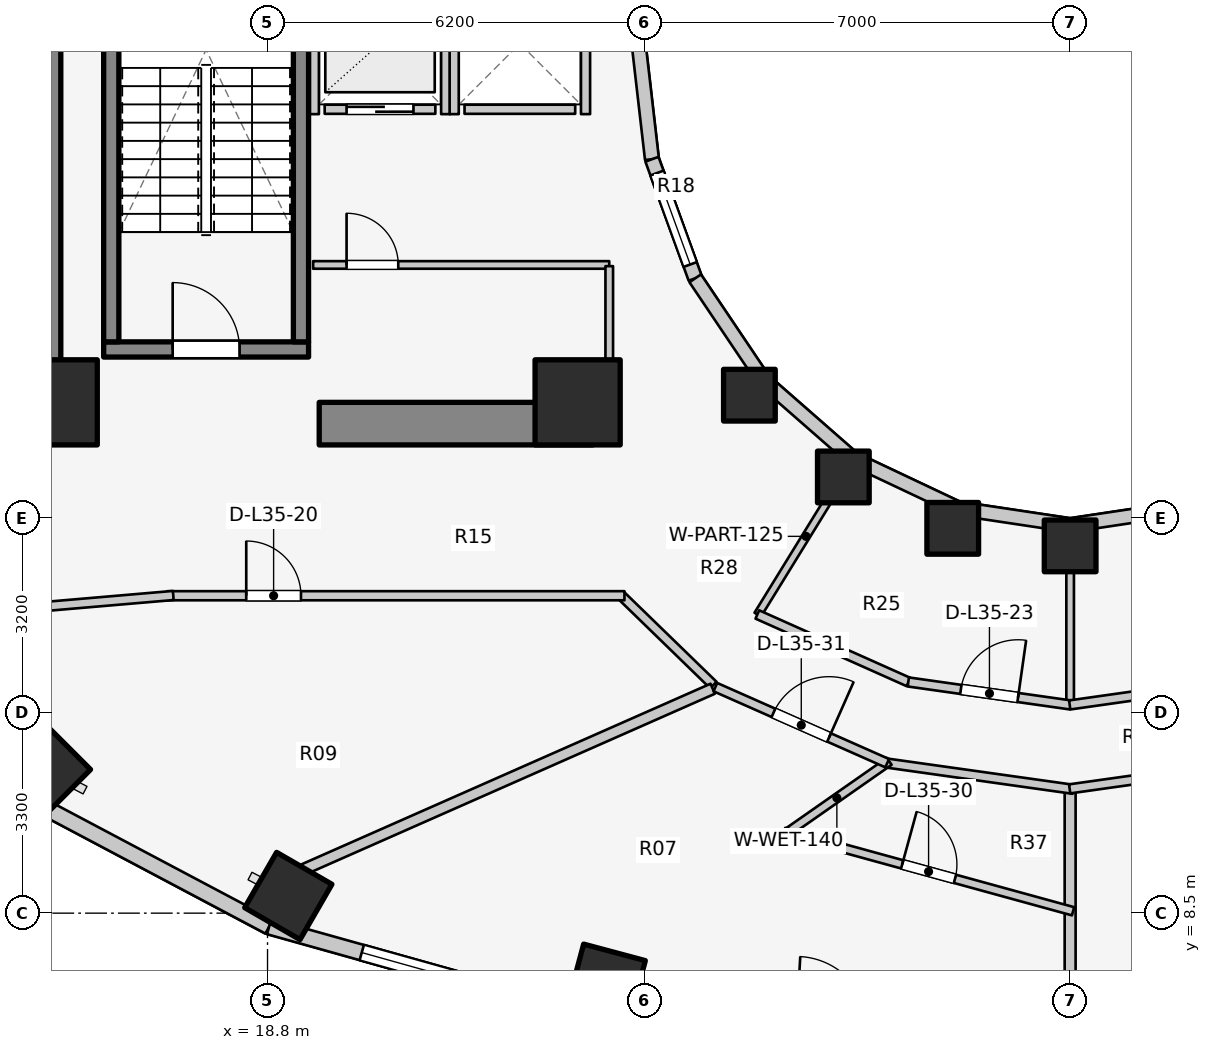
"""IFC4 building model, lengths in metres.
Left out: names, types, materials, properties, quantities, classifications, styles, units other than length and angle.
Written with IfcOpenShell. Run it as: python <this file> out.ifc"""

import sys

from ifc_helpers import new_model, si_unit, direction, frame, frame_2d, origin, origin_2d, place, context, subcontext, project, spatial, rectangle, extrude, element, fill, save


model = new_model("IFC4")
c1 = context("Model", 3, precision=1e-05, world=origin(), true_north=direction((0.0, 1.0)))
c2 = subcontext(c1, "Body", "Model", "MODEL_VIEW")
j1 = project(units=[si_unit("LENGTHUNIT", "METRE"), si_unit("PLANEANGLEUNIT", "RADIAN")], contexts=[c1])
p1 = place(None, origin())
s1 = spatial("IfcSite", under=j1, at=p1, CompositionType="ELEMENT")
p2 = place(p1, origin())
s2 = spatial("IfcBuilding", under=s1, at=p2, CompositionType="ELEMENT")
p3 = place(p2, frame((0.0, 0.0, 116.6)))
s3 = spatial("IfcBuildingStorey", under=s2, at=p3, CompositionType="ELEMENT", Elevation=116.6)
p4 = place(p3, frame((15.05, 17.05, 0.0), z_axis=(0.0, 0.0, 1.0), x_axis=(0.0, 1.0, 0.0)))
e1 = element("IfcWall", 1, at=p4, inside=s3, PredefinedType="SHEAR", context=c2, shape_type="SweptSolid", body=[
    extrude(rectangle(XDim=12.8, YDim=0.7, at=frame_2d((6.4, 0.0))), origin(), (0.0, 0.0, 1.0), 3.1),
])
p5 = place(p3, frame((19.65, 16.55, 0.0), z_axis=(0.0, 0.0, 1.0), x_axis=(1.0, 0.0, 0.0)))
e2 = element("IfcWall", 2, at=p5, inside=s3, PredefinedType="SHEAR", context=c2, shape_type="SweptSolid", body=[
    extrude(rectangle(XDim=4.5, YDim=0.7, at=frame_2d((2.25, 0.0))), origin(), (0.0, 0.0, 1.0), 3.1),
])
p6 = place(p3, frame((16.105, 17.77, 0.0), z_axis=(0.0, 0.0, 1.0), x_axis=(1.0, 0.0, 0.0)))
e3 = element("IfcWall", 3, at=p6, inside=s3, PredefinedType="SOLIDWALL", context=c2, shape_type="SweptSolid", body=[
    extrude(rectangle(XDim=3.37, YDim=0.25, at=frame_2d((1.685, 0.0))), origin(), (0.0, 0.0, 1.0), 3.1),
])
p7 = place(p6, frame((1.135, 0.0, 0.0)))
e4 = element("IfcOpeningElement", 4, at=p7, cuts=e3, PredefinedType="OPENING", context=c2, shape_type="SweptSolid", body=[
    extrude(rectangle(XDim=1.1, YDim=2.1, at=frame_2d((0.55, 1.05))), frame((0.0, 0.135, 0.0), z_axis=(0.0, -1.0, 0.0), x_axis=(1.0, 0.0, 0.0)), (0.0, 0.0, 1.0), 0.27),
])
for number, where, z_axis, x_axis in (
    (5, (16.23, 17.895, 0.0), (0.0, 0.0, 1.0), (0.0, 1.0, 0.0)),
    (6, (19.35, 17.895, 0.0), (0.0, 0.0, 1.0), (0.0, 1.0, 0.0)),
):
    element("IfcWall", number, at=place(p3, frame(where, z_axis=z_axis, x_axis=x_axis)), inside=s3, PredefinedType="SOLIDWALL", context=c2, shape_type="SweptSolid", body=[
        extrude(rectangle(XDim=7.81, YDim=0.25, at=frame_2d((3.905, 0.0))), origin(), (0.0, 0.0, 1.0), 3.1),
    ])
for number, where, z_axis, x_axis in (
    (7, (15.3, 16.9, 0.0), (0.0, 0.0, 1.0), (1.0, 0.0, 0.0)),
    (8, (23.9, 16.9, 0.0), (0.0, 0.0, 1.0), (1.0, 0.0, 0.0)),
):
    element("IfcColumn", number, at=place(p3, frame(where, z_axis=z_axis, x_axis=x_axis)), inside=s3, PredefinedType="COLUMN", context=c2, shape_type="SweptSolid", body=[
        extrude(rectangle(XDim=1.4, YDim=1.4, at=origin_2d()), origin(), (0.0, 0.0, 1.0), 3.1),
    ])
p8 = place(p3, frame((26.725, 17.018, 0.0), z_axis=(0.0, 0.0, 1.0), x_axis=(1.0, 0.0, 0.0)))
e9 = element("IfcColumn", 9, at=p8, inside=s3, PredefinedType="COLUMN", context=c2, shape_type="SweptSolid", body=[
    extrude(rectangle(XDim=0.85, YDim=0.85, at=origin_2d()), origin(), (0.0, 0.0, 1.0), 3.1),
])
p9 = place(p3, frame((15.147, 10.862, 0.0), z_axis=(0.0, 0.0, 1.0), x_axis=(-0.707106781187, -0.707106781187, 0.0)))
e10 = element("IfcColumn", 10, at=p9, inside=s3, PredefinedType="COLUMN", context=c2, shape_type="SweptSolid", body=[
    extrude(rectangle(XDim=1.05, YDim=1.05, at=origin_2d()), origin(), (0.0, 0.0, 1.0), 3.1),
])
p10 = place(p3, frame((28.27, 15.673, 0.0), z_axis=(0.0, 0.0, 1.0), x_axis=(1.0, 0.0, 0.0)))
e11 = element("IfcColumn", 11, at=p10, inside=s3, PredefinedType="COLUMN", context=c2, shape_type="SweptSolid", body=[
    extrude(rectangle(XDim=0.85, YDim=0.85, at=origin_2d()), origin(), (0.0, 0.0, 1.0), 3.1),
])
p11 = place(p3, frame((19.142, 8.782, 0.0), z_axis=(0.0, 0.0, 1.0), x_axis=(-0.5, -0.866025403784, 0.0)))
e12 = element("IfcColumn", 12, at=p11, inside=s3, PredefinedType="COLUMN", context=c2, shape_type="SweptSolid", body=[
    extrude(rectangle(XDim=1.05, YDim=1.05, at=origin_2d()), origin(), (0.0, 0.0, 1.0), 3.1),
])
p12 = place(p3, frame((30.069, 14.828, 0.0), z_axis=(0.0, 0.0, 1.0), x_axis=(1.0, 0.0, 0.0)))
e13 = element("IfcColumn", 13, at=p12, inside=s3, PredefinedType="COLUMN", context=c2, shape_type="SweptSolid", body=[
    extrude(rectangle(XDim=0.85, YDim=0.85, at=origin_2d()), origin(), (0.0, 0.0, 1.0), 3.1),
])
p13 = place(p3, frame((24.371, 7.348, 0.0), z_axis=(0.0, 0.0, 1.0), x_axis=(-0.258819045103, -0.965925826289, 0.0)))
e14 = element("IfcColumn", 14, at=p13, inside=s3, PredefinedType="COLUMN", context=c2, shape_type="SweptSolid", body=[
    extrude(rectangle(XDim=1.05, YDim=1.05, at=origin_2d()), origin(), (0.0, 0.0, 1.0), 3.1),
])
p14 = place(p3, frame((32.0, 14.54, 0.0), z_axis=(0.0, 0.0, 1.0), x_axis=(1.0, 0.0, 0.0)))
e15 = element("IfcColumn", 15, at=p14, inside=s3, PredefinedType="COLUMN", context=c2, shape_type="SweptSolid", body=[
    extrude(rectangle(XDim=0.85, YDim=0.85, at=origin_2d()), origin(), (0.0, 0.0, 1.0), 3.1),
])
p15 = place(p3, frame((24.88, 23.0, 0.0), z_axis=(0.0, 0.0, 1.0), x_axis=(0.114711713601, -0.993398823617, 0.0)))
e16 = element("IfcWall", 16, at=p15, inside=s3, PredefinedType="STANDARD", context=c2, shape_type="SweptSolid", body=[
    extrude(rectangle(XDim=2.115, YDim=0.23, at=frame_2d((1.058, 0.0))), origin(), (0.0, 0.0, 1.0), 2.84),
])
p16 = place(p3, frame((25.123, 20.898, 0.0), z_axis=(0.0, 0.0, 1.0), x_axis=(0.341423187295, -0.93990968033, 0.0)))
e17 = element("IfcWall", 17, at=p16, inside=s3, PredefinedType="STANDARD", context=c2, shape_type="SweptSolid", body=[
    extrude(rectangle(XDim=2.084, YDim=0.23, at=frame_2d((1.042, 0.0))), origin(), (0.0, 0.0, 1.0), 2.84),
])
p17 = place(p16, frame((0.242, 0.0, 0.85)))
e18 = element("IfcOpeningElement", 18, at=p17, cuts=e17, PredefinedType="OPENING", context=c2, shape_type="SweptSolid", body=[
    extrude(rectangle(XDim=1.6, YDim=1.65, at=frame_2d((0.8, 0.825))), frame((0.0, 0.125, 0.0), z_axis=(0.0, -1.0, 0.0), x_axis=(1.0, 0.0, 0.0)), (0.0, 0.0, 1.0), 0.25),
])
p18 = place(p3, frame((25.834, 18.94, 0.0), z_axis=(0.0, 0.0, 1.0), x_axis=(0.558197800898, -0.829707909492, 0.0)))
e19 = element("IfcWall", 19, at=p18, inside=s3, PredefinedType="STANDARD", context=c2, shape_type="SweptSolid", body=[
    extrude(rectangle(XDim=2.027, YDim=0.23, at=frame_2d((1.013, 0.0))), origin(), (0.0, 0.0, 1.0), 2.16),
])
p19 = place(p3, frame((26.965, 17.258, 0.0), z_axis=(0.0, 0.0, 1.0), x_axis=(0.752576694707, -0.658504607869, 0.0)))
e20 = element("IfcWall", 20, at=p19, inside=s3, PredefinedType="STANDARD", context=c2, shape_type="SweptSolid", body=[
    extrude(rectangle(XDim=1.959, YDim=0.23, at=frame_2d((0.98, 0.0))), origin(), (0.0, 0.0, 1.0), 2.16),
])
p20 = place(p3, frame((28.44, 15.968, 0.0), z_axis=(0.0, 0.0, 1.0), x_axis=(0.904179699603, -0.427152280606, 0.0)))
e21 = element("IfcWall", 21, at=p20, inside=s3, PredefinedType="STANDARD", context=c2, shape_type="SweptSolid", body=[
    extrude(rectangle(XDim=1.899, YDim=0.23, at=frame_2d((0.95, 0.0))), origin(), (0.0, 0.0, 1.0), 2.16),
])
for number, where, z_axis, x_axis in (
    (22, (30.157, 15.157, 0.0), (0.0, 0.0, 1.0), (0.989, -0.149, 0.0)),
    (23, (32.0, 14.88, 0.0), (0.0, 0.0, 1.0), (0.989, 0.149, 0.0)),
):
    element("IfcWall", number, at=place(p3, frame(where, z_axis=z_axis, x_axis=x_axis)), inside=s3, PredefinedType="STANDARD", context=c2, shape_type="SweptSolid", body=[
        extrude(rectangle(XDim=1.864, YDim=0.23, at=frame_2d((0.932, 0.0))), origin(), (0.0, 0.0, 1.0), 2.16),
    ])
p21 = place(p3, frame((14.734, 10.447, 0.0), z_axis=(0.0, 0.0, 1.0), x_axis=(0.883668636807, -0.4681129568, 0.0)))
e24 = element("IfcWall", 24, at=p21, inside=s3, PredefinedType="STANDARD", context=c2, shape_type="SweptSolid", body=[
    extrude(rectangle(XDim=4.631, YDim=0.26, at=frame_2d((2.316, 0.0))), origin(), (0.0, 0.0, 1.0), 2.85),
])
p22 = place(p3, frame((18.827, 8.279, 0.0), z_axis=(0.0, 0.0, 1.0), x_axis=(0.962938491413, -0.269721081407, 0.0)))
e25 = element("IfcWall", 25, at=p22, inside=s3, PredefinedType="STANDARD", context=c2, shape_type="SweptSolid", body=[
    extrude(rectangle(XDim=5.563, YDim=0.26, at=frame_2d((2.782, 0.0))), origin(), (0.0, 0.0, 1.0), 2.85),
])
p23 = place(p22, frame((1.582, 0.0, 0.75)))
e26 = element("IfcOpeningElement", 26, at=p23, cuts=e25, PredefinedType="OPENING", context=c2, shape_type="SweptSolid", body=[
    extrude(rectangle(XDim=2.4, YDim=1.7, at=frame_2d((1.2, 0.85))), frame((0.0, 0.14, 0.0), z_axis=(0.0, -1.0, 0.0), x_axis=(1.0, 0.0, 0.0)), (0.0, 0.0, 1.0), 0.28),
])
p24 = place(p3, frame((19.74, 21.72, 0.0), z_axis=(0.0, 0.0, 1.0), x_axis=(1.0, 0.0, 0.0)))
e27 = element("IfcWall", 27, at=p24, inside=s3, PredefinedType="SOLIDWALL", context=c2, shape_type="SweptSolid", body=[
    extrude(rectangle(XDim=1.82, YDim=0.15, at=frame_2d((0.91, 0.0))), origin(), (0.0, 0.0, 1.0), 2.855),
])
p25 = place(p24, frame((0.36, 0.0, 0.0)))
e28 = element("IfcOpeningElement", 28, at=p25, cuts=e27, PredefinedType="OPENING", context=c2, shape_type="SweptSolid", body=[
    extrude(rectangle(XDim=1.1, YDim=2.1, at=frame_2d((0.55, 1.05))), frame((0.0, 0.085, 0.0), z_axis=(0.0, -1.0, 0.0), x_axis=(1.0, 0.0, 0.0)), (0.0, 0.0, 1.0), 0.17),
])
for number, where, z_axis, x_axis in (
    (29, (19.57, 21.64, 0.0), (0.0, 0.0, 1.0), (0.0, 1.0, 0.0)),
    (30, (21.73, 21.64, 0.0), (0.0, 0.0, 1.0), (0.0, 1.0, 0.0)),
):
    element("IfcWall", number, at=place(p3, frame(where, z_axis=z_axis, x_axis=x_axis)), inside=s3, PredefinedType="SOLIDWALL", context=c2, shape_type="SweptSolid", body=[
        extrude(rectangle(XDim=2.32, YDim=0.15, at=frame_2d((1.16, 0.0))), origin(), (0.0, 0.0, 1.0), 2.855),
    ])
p26 = place(p3, frame((22.04, 21.72, 0.0), z_axis=(0.0, 0.0, 1.0), x_axis=(1.0, 0.0, 0.0)))
e31 = element("IfcWall", 31, at=p26, inside=s3, PredefinedType="SOLIDWALL", context=c2, shape_type="SweptSolid", body=[
    extrude(rectangle(XDim=1.82, YDim=0.15, at=frame_2d((0.91, 0.0))), origin(), (0.0, 0.0, 1.0), 2.12),
])
p27 = place(p3, frame((21.87, 21.64, 0.0), z_axis=(0.0, 0.0, 1.0), x_axis=(0.0, 1.0, 0.0)))
e32 = element("IfcWall", 32, at=p27, inside=s3, PredefinedType="SOLIDWALL", context=c2, shape_type="SweptSolid", body=[
    extrude(rectangle(XDim=2.32, YDim=0.15, at=frame_2d((1.16, 0.0))), origin(), (0.0, 0.0, 1.0), 2.855),
])
p28 = place(p3, frame((24.03, 21.64, 0.0), z_axis=(0.0, 0.0, 1.0), x_axis=(0.0, 1.0, 0.0)))
e33 = element("IfcWall", 33, at=p28, inside=s3, PredefinedType="SOLIDWALL", context=c2, shape_type="SweptSolid", body=[
    extrude(rectangle(XDim=2.32, YDim=0.15, at=frame_2d((1.16, 0.0))), origin(), (0.0, 0.0, 1.0), 2.12),
])
p29 = place(p3, frame((19.55, 19.16, 0.0), z_axis=(0.0, 0.0, 1.0), x_axis=(1.0, 0.0, 0.0)))
e34 = element("IfcWall", 34, at=p29, inside=s3, PredefinedType="PARTITIONING", context=c2, shape_type="SweptSolid", body=[
    extrude(rectangle(XDim=4.87, YDim=0.125, at=frame_2d((2.435, 0.0))), origin(), (0.0, 0.0, 1.0), 2.12),
])
p30 = place(p29, frame((0.55, 0.0, 0.0)))
e35 = element("IfcOpeningElement", 35, at=p30, cuts=e34, PredefinedType="OPENING", context=c2, shape_type="SweptSolid", body=[
    extrude(rectangle(XDim=0.85, YDim=2.05, at=frame_2d((0.425, 1.025))), frame((0.0, 0.073, 0.0), z_axis=(0.0, -1.0, 0.0), x_axis=(1.0, 0.0, 0.0)), (0.0, 0.0, 1.0), 0.145),
])
p31 = place(p3, frame((24.42, 17.1, 0.0), z_axis=(0.0, 0.0, 1.0), x_axis=(0.0, 1.0, 0.0)))
e36 = element("IfcWall", 36, at=p31, inside=s3, PredefinedType="PARTITIONING", context=c2, shape_type="SweptSolid", body=[
    extrude(rectangle(XDim=2.04, YDim=0.125, at=frame_2d((1.02, 0.0))), origin(), (0.0, 0.0, 1.0), 2.153),
])
p32 = place(p3, frame((26.133, 12.251, 0.0), z_axis=(0.0, 0.0, 1.0), x_axis=(-0.717419568599, 0.696641344302, 0.0)))
e37 = element("IfcWall", 37, at=p32, inside=s3, PredefinedType="PARTITIONING", context=c2, shape_type="SweptSolid", body=[
    extrude(rectangle(XDim=2.138, YDim=0.15, at=frame_2d((1.069, 0.0))), origin(), (0.0, 0.0, 1.0), 2.272),
])
p33 = place(p3, frame((17.15, 13.72, 0.0), z_axis=(0.0, 0.0, 1.0), x_axis=(1.0, 0.0, 0.0)))
e38 = element("IfcWall", 38, at=p33, inside=s3, PredefinedType="PARTITIONING", context=c2, shape_type="SweptSolid", body=[
    extrude(rectangle(XDim=7.52, YDim=0.15, at=frame_2d((3.76, 0.0))), origin(), (0.0, 0.0, 1.0), 2.272),
])
p34 = place(p33, frame((1.3, 0.0, 0.0)))
e39 = element("IfcOpeningElement", 39, at=p34, cuts=e38, PredefinedType="OPENING", context=c2, shape_type="SweptSolid", body=[
    extrude(rectangle(XDim=0.9, YDim=2.1, at=frame_2d((0.45, 1.05))), frame((0.0, 0.085, 0.0), z_axis=(0.0, -1.0, 0.0), x_axis=(1.0, 0.0, 0.0)), (0.0, 0.0, 1.0), 0.17),
])
p35 = place(p3, frame((17.25, 13.724, 0.0), z_axis=(0.0, 0.0, 1.0), x_axis=(-0.996341886029, -0.085456691633, 0.0)))
e40 = element("IfcWall", 40, at=p35, inside=s3, PredefinedType="PARTITIONING", context=c2, shape_type="SweptSolid", body=[
    extrude(rectangle(XDim=6.108, YDim=0.15, at=frame_2d((3.054, 0.0))), origin(), (0.0, 0.0, 1.0), 2.142),
])
p36 = place(p3, frame((28.45, 15.985, 0.0), z_axis=(0.0, 0.0, 1.0), x_axis=(-0.524565340045, -0.851370192116, 0.0)))
e41 = element("IfcWall", 41, at=p36, inside=s3, PredefinedType="PARTITIONING", context=c2, shape_type="SweptSolid", body=[
    extrude(rectangle(XDim=3.027, YDim=0.125, at=frame_2d((1.514, 0.0))), origin(), (0.0, 0.0, 1.0), 2.272),
])
p37 = place(p3, frame((32.0, 14.9, 0.0), z_axis=(0.0, 0.0, 1.0), x_axis=(0.0, -1.0, 0.0)))
e42 = element("IfcWall", 42, at=p37, inside=s3, PredefinedType="PARTITIONING", context=c2, shape_type="SweptSolid", body=[
    extrude(rectangle(XDim=2.976, YDim=0.125, at=frame_2d((1.488, 0.0))), origin(), (0.0, 0.0, 1.0), 2.272),
])
p38 = place(p3, frame((26.856, 13.412, 0.0), z_axis=(0.0, 0.0, 1.0), x_axis=(0.912985265053, -0.407992531545, 0.0)))
e43 = element("IfcWall", 43, at=p38, inside=s3, PredefinedType="PARTITIONING", context=c2, shape_type="SweptSolid", body=[
    extrude(rectangle(XDim=2.723, YDim=0.15, at=frame_2d((1.362, 0.0))), origin(), (0.0, 0.0, 1.0), 2.272),
])
p39 = place(p3, frame((29.339, 12.302, 0.0), z_axis=(0.0, 0.0, 1.0), x_axis=(0.990119079966, -0.140229124958, 0.0)))
e44 = element("IfcWall", 44, at=p39, inside=s3, PredefinedType="PARTITIONING", context=c2, shape_type="SweptSolid", body=[
    extrude(rectangle(XDim=2.695, YDim=0.15, at=frame_2d((1.348, 0.0))), origin(), (0.0, 0.0, 1.0), 2.272),
])
p40 = place(p39, frame((0.873, 0.0, 0.0)))
e45 = element("IfcOpeningElement", 45, at=p40, cuts=e44, PredefinedType="OPENING", context=c2, shape_type="SweptSolid", body=[
    extrude(rectangle(XDim=0.95, YDim=2.1, at=frame_2d((0.475, 1.05))), frame((0.0, 0.085, 0.0), z_axis=(0.0, -1.0, 0.0), x_axis=(1.0, 0.0, 0.0)), (0.0, 0.0, 1.0), 0.17),
])
p41 = place(p3, frame((31.993, 11.924, 0.0), z_axis=(0.0, 0.0, 1.0), x_axis=(0.990119079966, 0.140229124958, 0.0)))
e46 = element("IfcWall", 46, at=p41, inside=s3, PredefinedType="PARTITIONING", context=c2, shape_type="SweptSolid", body=[
    extrude(rectangle(XDim=2.695, YDim=0.15, at=frame_2d((1.348, 0.0))), origin(), (0.0, 0.0, 1.0), 2.272),
])
p42 = place(p3, frame((26.122, 12.191, 0.0), z_axis=(0.0, 0.0, 1.0), x_axis=(-0.914765930761, -0.403984271872, 0.0)))
e47 = element("IfcWall", 47, at=p42, inside=s3, PredefinedType="PARTITIONING", context=c2, shape_type="SweptSolid", body=[
    extrude(rectangle(XDim=7.354, YDim=0.18, at=frame_2d((3.677, 0.0))), origin(), (0.0, 0.0, 1.0), 2.272),
])
p43 = place(p3, frame((32.0, 10.489, 0.0), z_axis=(0.0, 0.0, 1.0), x_axis=(0.0, -1.0, 0.0)))
e48 = element("IfcWall", 48, at=p43, inside=s3, PredefinedType="PARTITIONING", context=c2, shape_type="SweptSolid", body=[
    extrude(rectangle(XDim=3.064, YDim=0.18, at=frame_2d((1.532, 0.0))), origin(), (0.0, 0.0, 1.0), 2.272),
])
p44 = place(p3, frame((28.934, 10.975, 0.0), z_axis=(0.0, 0.0, 1.0), x_axis=(0.990254405439, -0.139270285808, 0.0)))
e49 = element("IfcWall", 49, at=p44, inside=s3, PredefinedType="PARTITIONING", context=c2, shape_type="SweptSolid", body=[
    extrude(rectangle(XDim=3.147, YDim=0.15, at=frame_2d((1.573, 0.0))), origin(), (0.0, 0.0, 1.0), 2.272),
])
p45 = place(p3, frame((29.024, 10.997, 0.0), z_axis=(0.0, 0.0, 1.0), x_axis=(-0.819614061163, -0.572916041619, 0.0)))
e50 = element("IfcWall", 50, at=p45, inside=s3, PredefinedType="PLUMBINGWALL", context=c2, shape_type="SweptSolid", body=[
    extrude(rectangle(XDim=2.1, YDim=0.14, at=frame_2d((1.05, 0.0))), origin(), (0.0, 0.0, 1.0), 2.385),
])
p46 = place(p3, frame((27.296, 9.836, 0.0), z_axis=(0.0, 0.0, 1.0), x_axis=(0.964308540899, -0.26478111328, 0.0)))
e51 = element("IfcWall", 51, at=p46, inside=s3, PredefinedType="PLUMBINGWALL", context=c2, shape_type="SweptSolid", body=[
    extrude(rectangle(XDim=4.928, YDim=0.14, at=frame_2d((2.464, 0.0))), origin(), (0.0, 0.0, 1.0), 2.272),
])
p47 = place(p46, frame((2.014, 0.0, 0.0)))
e52 = element("IfcOpeningElement", 52, at=p47, cuts=e51, PredefinedType="OPENING", context=c2, shape_type="SweptSolid", body=[
    extrude(rectangle(XDim=0.9, YDim=2.1, at=frame_2d((0.45, 1.05))), frame((0.0, 0.08, 0.0), z_axis=(0.0, -1.0, 0.0), x_axis=(1.0, 0.0, 0.0)), (0.0, 0.0, 1.0), 0.16),
])
p48 = place(p3, frame((26.165, 12.217, 0.0), z_axis=(0.0, 0.0, 1.0), x_axis=(0.91445214467, -0.404694051239, 0.0)))
e53 = element("IfcWall", 53, at=p48, inside=s3, PredefinedType="PARTITIONING", context=c2, shape_type="SweptSolid", body=[
    extrude(rectangle(XDim=3.091, YDim=0.15, at=frame_2d((1.545, 0.0))), origin(), (0.0, 0.0, 1.0), 2.272),
])
p49 = place(p48, frame((1.045, 0.0, 0.0)))
e54 = element("IfcOpeningElement", 54, at=p49, cuts=e53, PredefinedType="OPENING", context=c2, shape_type="SweptSolid", body=[
    extrude(rectangle(XDim=1.0, YDim=2.1, at=frame_2d((0.5, 1.05))), frame((0.0, 0.085, 0.0), z_axis=(0.0, -1.0, 0.0), x_axis=(1.0, 0.0, 0.0)), (0.0, 0.0, 1.0), 0.17),
])
p50 = place(p3, frame((31.992, 10.544, 0.0), z_axis=(0.0, 0.0, 1.0), x_axis=(0.990243864279, 0.139345216129, 0.0)))
e55 = element("IfcWall", 55, at=p50, inside=s3, PredefinedType="PARTITIONING", context=c2, shape_type="SweptSolid", body=[
    extrude(rectangle(XDim=3.062, YDim=0.15, at=frame_2d((1.531, 0.0))), origin(), (0.0, 0.0, 1.0), 2.272),
])
p51 = place(p17, origin())
e56 = element("IfcWindow", 56, at=p51, inside=s3, PartitioningType="SINGLE_PANEL", PredefinedType="WINDOW", context=c2, shape_type="SweptSolid", body=[
    extrude(rectangle(XDim=1.6, YDim=1.65, at=frame_2d((0.8, 0.825))), frame((0.0, 0.03, 0.0), z_axis=(0.0, -1.0, 0.0), x_axis=(1.0, 0.0, 0.0)), (0.0, 0.0, 1.0), 0.06),
])
fill(e18, e56)
p52 = place(p23, origin())
e57 = element("IfcWindow", 57, at=p52, inside=s3, PartitioningType="SINGLE_PANEL", PredefinedType="WINDOW", context=c2, shape_type="SweptSolid", body=[
    extrude(rectangle(XDim=2.4, YDim=1.7, at=frame_2d((1.2, 0.85))), frame((0.0, 0.03, 0.0), z_axis=(0.0, -1.0, 0.0), x_axis=(1.0, 0.0, 0.0)), (0.0, 0.0, 1.0), 0.06),
])
fill(e26, e57)
p53 = place(p7, origin())
e58 = element("IfcDoor", 58, at=p53, inside=s3, OperationType="SINGLE_SWING_LEFT", PredefinedType="DOOR", context=c2, shape_type="SweptSolid", body=[
    extrude(rectangle(XDim=1.1, YDim=2.1, at=frame_2d((0.55, 1.05))), frame((0.0, 0.025, 0.0), z_axis=(0.0, -1.0, 0.0), x_axis=(1.0, 0.0, 0.0)), (0.0, 0.0, 1.0), 0.05),
])
fill(e4, e58)
p54 = place(p25, origin())
e59 = element("IfcDoor", 59, at=p54, inside=s3, OperationType="DOUBLE_DOOR_SLIDING", PredefinedType="DOOR", context=c2, shape_type="SweptSolid", body=[
    extrude(rectangle(XDim=1.1, YDim=2.1, at=frame_2d((0.55, 1.05))), frame((0.0, 0.025, 0.0), z_axis=(0.0, -1.0, 0.0), x_axis=(1.0, 0.0, 0.0)), (0.0, 0.0, 1.0), 0.05),
])
fill(e28, e59)
p55 = place(p30, origin())
e60 = element("IfcDoor", 60, at=p55, inside=s3, OperationType="SINGLE_SWING_LEFT", PredefinedType="DOOR", context=c2, shape_type="SweptSolid", body=[
    extrude(rectangle(XDim=0.85, YDim=2.05, at=frame_2d((0.425, 1.025))), frame((0.0, 0.025, 0.0), z_axis=(0.0, -1.0, 0.0), x_axis=(1.0, 0.0, 0.0)), (0.0, 0.0, 1.0), 0.05),
])
fill(e35, e60)
p56 = place(p34, origin())
e61 = element("IfcDoor", 61, at=p56, inside=s3, OperationType="SINGLE_SWING_LEFT", PredefinedType="DOOR", context=c2, shape_type="SweptSolid", body=[
    extrude(rectangle(XDim=0.9, YDim=2.1, at=frame_2d((0.45, 1.05))), frame((0.0, 0.025, 0.0), z_axis=(0.0, -1.0, 0.0), x_axis=(1.0, 0.0, 0.0)), (0.0, 0.0, 1.0), 0.05),
])
fill(e39, e61)
p57 = place(p40, origin())
e62 = element("IfcDoor", 62, at=p57, inside=s3, OperationType="SINGLE_SWING_RIGHT", PredefinedType="DOOR", context=c2, shape_type="SweptSolid", body=[
    extrude(rectangle(XDim=0.95, YDim=2.1, at=frame_2d((0.475, 1.05))), frame((0.0, 0.025, 0.0), z_axis=(0.0, -1.0, 0.0), x_axis=(1.0, 0.0, 0.0)), (0.0, 0.0, 1.0), 0.05),
])
fill(e45, e62)
p58 = place(p47, origin())
e63 = element("IfcDoor", 63, at=p58, inside=s3, OperationType="SINGLE_SWING_LEFT", PredefinedType="DOOR", context=c2, shape_type="SweptSolid", body=[
    extrude(rectangle(XDim=0.9, YDim=2.1, at=frame_2d((0.45, 1.05))), frame((0.0, 0.025, 0.0), z_axis=(0.0, -1.0, 0.0), x_axis=(1.0, 0.0, 0.0)), (0.0, 0.0, 1.0), 0.05),
])
fill(e52, e63)
p59 = place(p49, origin())
e64 = element("IfcDoor", 64, at=p59, inside=s3, OperationType="SINGLE_SWING_RIGHT", PredefinedType="DOOR", context=c2, shape_type="SweptSolid", body=[
    extrude(rectangle(XDim=1.0, YDim=2.1, at=frame_2d((0.5, 1.05))), frame((0.0, 0.025, 0.0), z_axis=(0.0, -1.0, 0.0), x_axis=(1.0, 0.0, 0.0)), (0.0, 0.0, 1.0), 0.05),
])
fill(e54, e64)
save(model, sys.argv[1])
